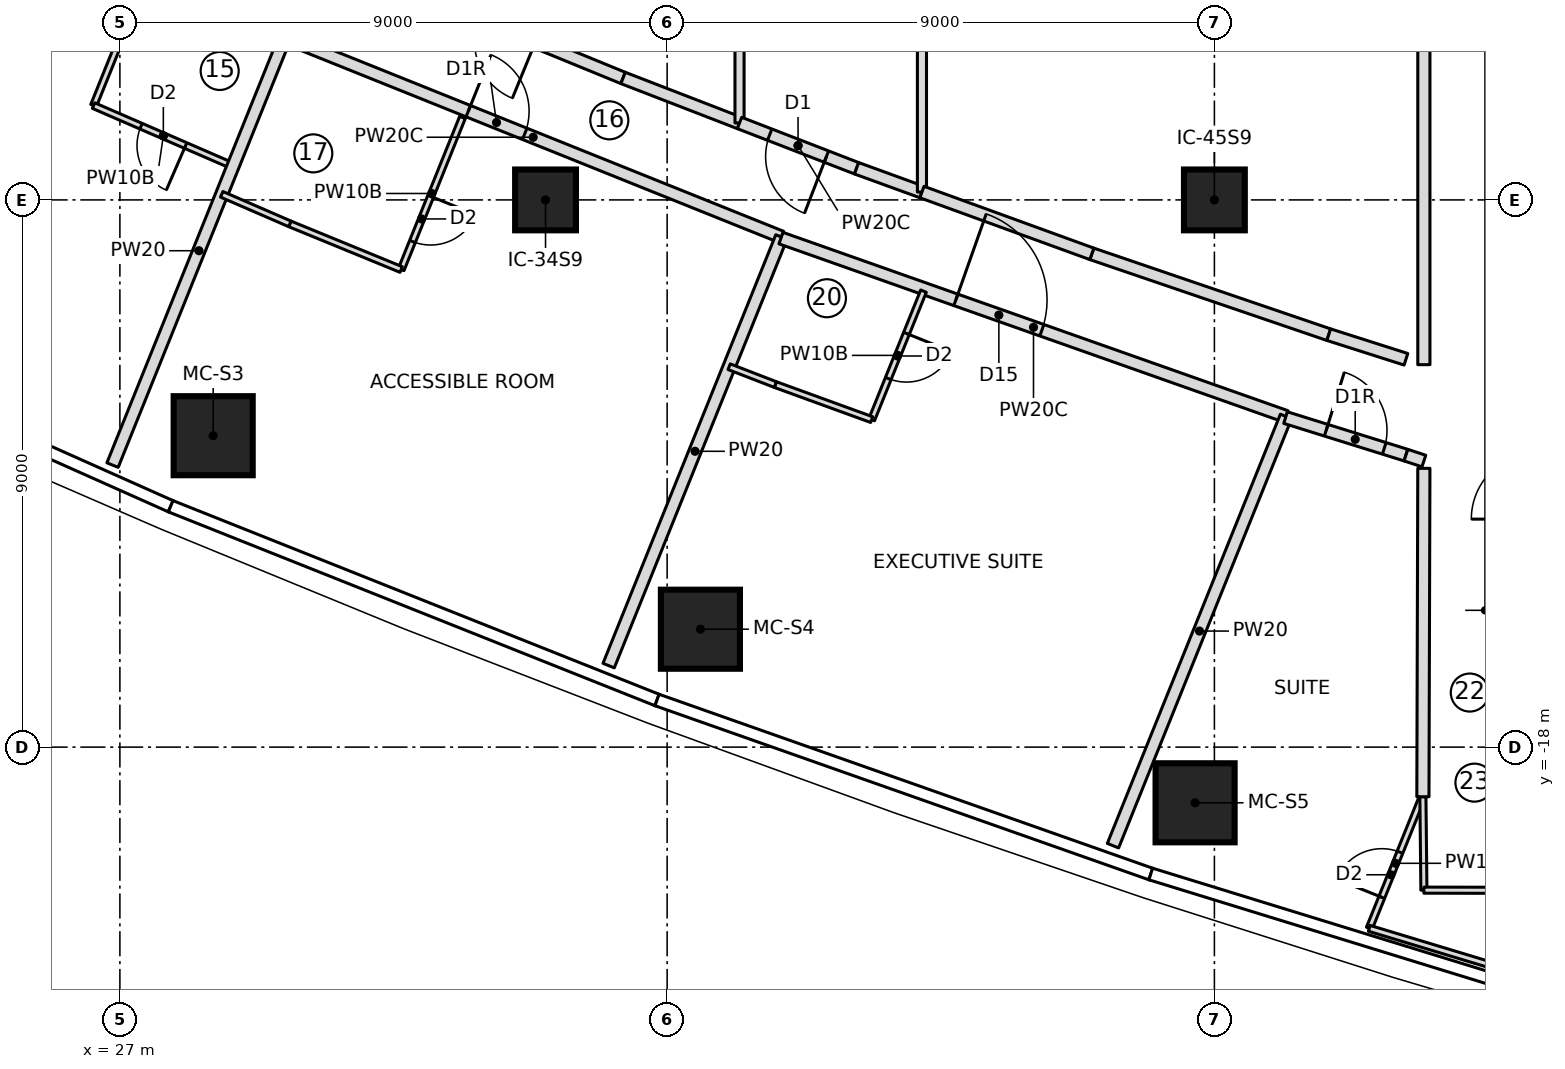
"""IFC4 building model, lengths in metres.
Left out: names, types, materials, properties, quantities, classifications, styles, units other than length and angle.
Written with IfcOpenShell. Run it as: python <this file> out.ifc"""

import sys

from ifc_helpers import new_model, si_unit, direction, frame, frame_2d, origin, origin_2d, place, context, subcontext, project, spatial, rectangle, extrude, element, fill, save


model = new_model("IFC4")
c1 = context("Model", 3, precision=1e-05, world=origin(), true_north=direction((0.0, 1.0)))
c2 = subcontext(c1, "Body", "Model", "MODEL_VIEW")
j1 = project(units=[si_unit("LENGTHUNIT", "METRE"), si_unit("PLANEANGLEUNIT", "RADIAN")], contexts=[c1])
p1 = place(None, origin())
s1 = spatial("IfcSite", under=j1, at=p1, CompositionType="ELEMENT")
p2 = place(p1, origin())
s2 = spatial("IfcBuilding", under=s1, at=p2, CompositionType="ELEMENT")
p3 = place(p2, frame((0.0, 0.0, 193.25)))
s3 = spatial("IfcBuildingStorey", under=s2, at=p3, CompositionType="ELEMENT", Elevation=193.25)
for number, where, z_axis, x_axis in (
    (1, (28.534, -12.878, 0.0), (0.0, 0.0, 1.0), (1.0, 0.0, 0.0)),
    (2, (36.547, -16.061, 0.0), (0.0, 0.0, 1.0), (1.0, 0.0, 0.0)),
    (3, (44.683, -18.916, 0.0), (0.0, 0.0, 1.0), (1.0, 0.0, 0.0)),
):
    element("IfcColumn", number, at=place(p3, frame(where, z_axis=z_axis, x_axis=x_axis)), inside=s3, PredefinedType="COLUMN", context=c2, shape_type="SweptSolid", body=[
        extrude(rectangle(XDim=1.3, YDim=1.3, at=origin_2d()), origin(), (0.0, 0.0, 1.0), 3.55),
    ])
for number, where, z_axis, x_axis in (
    (4, (34.0, -9.0, 0.0), (0.0, 0.0, 1.0), (1.0, 0.0, 0.0)),
    (5, (45.0, -9.0, 0.0), (0.0, 0.0, 1.0), (1.0, 0.0, 0.0)),
):
    element("IfcColumn", number, at=place(p3, frame(where, z_axis=z_axis, x_axis=x_axis)), inside=s3, PredefinedType="COLUMN", context=c2, shape_type="SweptSolid", body=[
        extrude(rectangle(XDim=1.0, YDim=1.0, at=origin_2d()), origin(), (0.0, 0.0, 1.0), 3.55),
    ])
p4 = place(p3, frame((26.567, -7.449, 0.0), z_axis=(0.0, 0.0, 1.0), x_axis=(0.373957926662, 0.927445669075, 0.0)))
e6 = element("IfcWall", 6, at=p4, inside=s3, PredefinedType="PARTITIONING", context=c2, shape_type="SweptSolid", body=[
    extrude(rectangle(XDim=2.278, YDim=0.1, at=frame_2d((1.139, 0.0))), origin(), (0.0, 0.0, 1.0), 3.25),
])
p5 = place(p3, frame((28.861, -8.444, 0.0), z_axis=(0.0, 0.0, 1.0), x_axis=(-0.917363173809, 0.398051262199, 0.0)))
e7 = element("IfcWall", 7, at=p5, inside=s3, PredefinedType="PARTITIONING", context=c2, shape_type="SweptSolid", body=[
    extrude(rectangle(XDim=2.5, YDim=0.1, at=frame_2d((1.25, 0.0))), origin(), (0.0, 0.0, 1.0), 3.25),
])
p6 = place(p5, frame((0.85, 0.0, 0.0)))
e8 = element("IfcOpeningElement", 8, at=p6, cuts=e7, PredefinedType="OPENING", context=c2, shape_type="SweptSolid", body=[
    extrude(rectangle(XDim=0.8, YDim=2.1, at=frame_2d((0.4, 1.05))), frame((0.0, 0.06, 0.0), z_axis=(0.0, -1.0, 0.0), x_axis=(1.0, 0.0, 0.0)), (0.0, 0.0, 1.0), 0.12),
])
p7 = place(p3, frame((26.879, -13.361, 0.0), z_axis=(0.0, 0.0, 1.0), x_axis=(0.37388636046, 0.927474522271, 0.0)))
e9 = element("IfcWall", 9, at=p7, inside=s3, PredefinedType="PARTITIONING", context=c2, shape_type="SweptSolid", body=[
    extrude(rectangle(XDim=7.603, YDim=0.2, at=frame_2d((3.801, 0.0))), origin(), (0.0, 0.0, 1.0), 3.25),
])
p8 = place(p3, frame((29.714, -6.329, 0.0), z_axis=(0.0, 0.0, 1.0), x_axis=(0.927886226391, -0.372863448026, 0.0)))
e10 = element("IfcWall", 10, at=p8, inside=s3, PredefinedType="PARTITIONING", context=c2, shape_type="SweptSolid", body=[
    extrude(rectangle(XDim=8.8, YDim=0.2, at=frame_2d((4.4, 0.0))), origin(), (0.0, 0.0, 1.0), 3.25),
])
p9 = place(p8, frame((3.25, 0.0, 0.0)))
e11 = element("IfcOpeningElement", 11, at=p9, cuts=e10, PredefinedType="OPENING", context=c2, shape_type="SweptSolid", body=[
    extrude(rectangle(XDim=1.0, YDim=2.1, at=frame_2d((0.5, 1.05))), frame((0.0, 0.11, 0.0), z_axis=(0.0, -1.0, 0.0), x_axis=(1.0, 0.0, 0.0)), (0.0, 0.0, 1.0), 0.22),
])
p10 = place(p3, frame((32.635, -7.644, 0.0), z_axis=(0.0, 0.0, 1.0), x_axis=(-0.373933172856, -0.927455649742, 0.0)))
e12 = element("IfcWall", 12, at=p10, inside=s3, PredefinedType="PARTITIONING", context=c2, shape_type="SweptSolid", body=[
    extrude(rectangle(XDim=2.697, YDim=0.1, at=frame_2d((1.349, 0.0))), origin(), (0.0, 0.0, 1.0), 3.25),
])
p11 = place(p10, frame((1.4, 0.0, 0.0)))
e13 = element("IfcOpeningElement", 13, at=p11, cuts=e12, PredefinedType="OPENING", context=c2, shape_type="SweptSolid", body=[
    extrude(rectangle(XDim=0.8, YDim=2.1, at=frame_2d((0.4, 1.05))), frame((0.0, 0.06, 0.0), z_axis=(0.0, -1.0, 0.0), x_axis=(1.0, 0.0, 0.0)), (0.0, 0.0, 1.0), 0.12),
])
p12 = place(p3, frame((31.626, -10.145, 0.0), z_axis=(0.0, 0.0, 1.0), x_axis=(-0.925208599746, 0.379458887043, 0.0)))
e14 = element("IfcWall", 14, at=p12, inside=s3, PredefinedType="PARTITIONING", context=c2, shape_type="SweptSolid", body=[
    extrude(rectangle(XDim=1.979, YDim=0.1, at=frame_2d((0.99, 0.0))), origin(), (0.0, 0.0, 1.0), 3.25),
])
p13 = place(p3, frame((29.795, -9.394, 0.0), z_axis=(0.0, 0.0, 1.0), x_axis=(-0.917378066425, 0.398016938386, 0.0)))
e15 = element("IfcWall", 15, at=p13, inside=s3, PredefinedType="PARTITIONING", context=c2, shape_type="SweptSolid", body=[
    extrude(rectangle(XDim=1.221, YDim=0.1, at=frame_2d((0.611, 0.0))), origin(), (0.0, 0.0, 1.0), 3.25),
])
p14 = place(p3, frame((35.038, -16.659, 0.0), z_axis=(0.0, 0.0, 1.0), x_axis=(0.373892577014, 0.927472016211, 0.0)))
e16 = element("IfcWall", 16, at=p14, inside=s3, PredefinedType="PARTITIONING", context=c2, shape_type="SweptSolid", body=[
    extrude(rectangle(XDim=7.601, YDim=0.2, at=frame_2d((3.8, 0.0))), origin(), (0.0, 0.0, 1.0), 3.25),
])
p15 = place(p3, frame((37.872, -9.628, 0.0), z_axis=(0.0, 0.0, 1.0), x_axis=(0.9429299378, -0.332991189675, 0.0)))
e17 = element("IfcWall", 17, at=p15, inside=s3, PredefinedType="PARTITIONING", context=c2, shape_type="SweptSolid", body=[
    extrude(rectangle(XDim=8.808, YDim=0.2, at=frame_2d((4.404, 0.0))), origin(), (0.0, 0.0, 1.0), 3.25),
])
p16 = place(p15, frame((3.05, 0.0, 0.0)))
e18 = element("IfcOpeningElement", 18, at=p16, cuts=e17, PredefinedType="OPENING", context=c2, shape_type="SweptSolid", body=[
    extrude(rectangle(XDim=1.5, YDim=2.1, at=frame_2d((0.75, 1.05))), frame((0.0, 0.11, 0.0), z_axis=(0.0, -1.0, 0.0), x_axis=(1.0, 0.0, 0.0)), (0.0, 0.0, 1.0), 0.22),
])
p17 = place(p3, frame((40.216, -10.5, 0.0), z_axis=(0.0, 0.0, 1.0), x_axis=(-0.373883593317, -0.927475637765, 0.0)))
e19 = element("IfcWall", 19, at=p17, inside=s3, PredefinedType="PARTITIONING", context=c2, shape_type="SweptSolid", body=[
    extrude(rectangle(XDim=2.278, YDim=0.1, at=frame_2d((1.139, 0.0))), origin(), (0.0, 0.0, 1.0), 3.25),
])
p18 = place(p17, frame((0.75, 0.0, 0.0)))
e20 = element("IfcOpeningElement", 20, at=p18, cuts=e19, PredefinedType="OPENING", context=c2, shape_type="SweptSolid", body=[
    extrude(rectangle(XDim=0.8, YDim=2.1, at=frame_2d((0.4, 1.05))), frame((0.0, 0.06, 0.0), z_axis=(0.0, -1.0, 0.0), x_axis=(1.0, 0.0, 0.0)), (0.0, 0.0, 1.0), 0.12),
])
p19 = place(p3, frame((39.364, -12.614, 0.0), z_axis=(0.0, 0.0, 1.0), x_axis=(-0.939759586286, 0.341836101053, 0.0)))
e21 = element("IfcWall", 21, at=p19, inside=s3, PredefinedType="PARTITIONING", context=c2, shape_type="SweptSolid", body=[
    extrude(rectangle(XDim=1.686, YDim=0.1, at=frame_2d((0.843, 0.0))), origin(), (0.0, 0.0, 1.0), 3.25),
])
p20 = place(p3, frame((37.78, -12.037, 0.0), z_axis=(0.0, 0.0, 1.0), x_axis=(-0.9326493613, 0.360784102846, 0.0)))
e22 = element("IfcWall", 22, at=p20, inside=s3, PredefinedType="PARTITIONING", context=c2, shape_type="SweptSolid", body=[
    extrude(rectangle(XDim=0.815, YDim=0.1, at=frame_2d((0.408, 0.0))), origin(), (0.0, 0.0, 1.0), 3.25),
])
p21 = place(p3, frame((43.332, -19.621, 0.0), z_axis=(0.0, 0.0, 1.0), x_axis=(0.373905590149, 0.927466770108, 0.0)))
e23 = element("IfcWall", 23, at=p21, inside=s3, PredefinedType="PARTITIONING", context=c2, shape_type="SweptSolid", body=[
    extrude(rectangle(XDim=7.611, YDim=0.2, at=frame_2d((3.806, 0.0))), origin(), (0.0, 0.0, 1.0), 3.25),
])
p22 = place(p3, frame((47.547, -20.98, 0.0), z_axis=(0.0, 0.0, 1.0), x_axis=(0.373908119057, 0.927465750582, 0.0)))
e24 = element("IfcWall", 24, at=p22, inside=s3, PredefinedType="PARTITIONING", context=c2, shape_type="SweptSolid", body=[
    extrude(rectangle(XDim=2.306, YDim=0.1, at=frame_2d((1.153, 0.0))), origin(), (0.0, 0.0, 1.0), 3.25),
])
p23 = place(p22, frame((0.55, 0.0, 0.0)))
e25 = element("IfcOpeningElement", 25, at=p23, cuts=e24, PredefinedType="OPENING", context=c2, shape_type="SweptSolid", body=[
    extrude(rectangle(XDim=0.8, YDim=2.1, at=frame_2d((0.4, 1.05))), frame((0.0, 0.06, 0.0), z_axis=(0.0, -1.0, 0.0), x_axis=(1.0, 0.0, 0.0)), (0.0, 0.0, 1.0), 0.12),
])
p24 = place(p3, frame((35.276, -6.994, 0.0), z_axis=(0.0, 0.0, 1.0), x_axis=(-0.92520652337, 0.379463949689, 0.0)))
e26 = element("IfcWall", 26, at=p24, inside=s3, PredefinedType="PARTITIONING", context=c2, shape_type="SweptSolid", body=[
    extrude(rectangle(XDim=4.117, YDim=0.2, at=frame_2d((2.059, 0.0))), origin(), (0.0, 0.0, 1.0), 3.25),
])
p25 = place(p24, frame((1.559, 0.0, 0.0)))
e27 = element("IfcOpeningElement", 27, at=p25, cuts=e26, PredefinedType="OPENING", context=c2, shape_type="SweptSolid", body=[
    extrude(rectangle(XDim=1.0, YDim=2.1, at=frame_2d((0.5, 1.05))), frame((0.0, 0.11, 0.0), z_axis=(0.0, -1.0, 0.0), x_axis=(1.0, 0.0, 0.0)), (0.0, 0.0, 1.0), 0.22),
])
p26 = place(p3, frame((37.19, -7.735, 0.0), z_axis=(0.0, 0.0, 1.0), x_axis=(-0.932688150298, 0.360683814848, 0.0)))
e28 = element("IfcWall", 28, at=p26, inside=s3, PredefinedType="PARTITIONING", context=c2, shape_type="SweptSolid", body=[
    extrude(rectangle(XDim=2.053, YDim=0.2, at=frame_2d((1.026, 0.0))), origin(), (0.0, 0.0, 1.0), 3.25),
])
p27 = place(p3, frame((37.19, -7.735, 0.0), z_axis=(0.0, 0.0, 1.0), x_axis=(0.0, 1.0, 0.0)))
e29 = element("IfcWall", 29, at=p27, inside=s3, PredefinedType="PARTITIONING", context=c2, shape_type="SweptSolid", body=[
    extrude(rectangle(XDim=15.47, YDim=0.15, at=frame_2d((7.735, 0.0))), origin(), (0.0, 0.0, 1.0), 3.25),
])
p28 = place(p3, frame((39.115, -8.479, 0.0), z_axis=(0.0, 0.0, 1.0), x_axis=(-0.9326579855, 0.360761807961, 0.0)))
e30 = element("IfcWall", 30, at=p28, inside=s3, PredefinedType="PARTITIONING", context=c2, shape_type="SweptSolid", body=[
    extrude(rectangle(XDim=2.064, YDim=0.2, at=frame_2d((1.032, 0.0))), origin(), (0.0, 0.0, 1.0), 3.25),
])
p29 = place(p28, frame((0.532, 0.0, 0.0)))
e31 = element("IfcOpeningElement", 31, at=p29, cuts=e30, PredefinedType="OPENING", context=c2, shape_type="SweptSolid", body=[
    extrude(rectangle(XDim=1.0, YDim=2.1, at=frame_2d((0.5, 1.05))), frame((0.0, 0.11, 0.0), z_axis=(0.0, -1.0, 0.0), x_axis=(1.0, 0.0, 0.0)), (0.0, 0.0, 1.0), 0.22),
])
p30 = place(p3, frame((40.19, -8.871, 0.0), z_axis=(0.0, 0.0, 1.0), x_axis=(-0.939731092615, 0.34191442434, 0.0)))
e32 = element("IfcWall", 32, at=p30, inside=s3, PredefinedType="PARTITIONING", context=c2, shape_type="SweptSolid", body=[
    extrude(rectangle(XDim=1.144, YDim=0.2, at=frame_2d((0.572, 0.0))), origin(), (0.0, 0.0, 1.0), 3.25),
])
p31 = place(p3, frame((40.19, -8.871, 0.0), z_axis=(0.0, 0.0, 1.0), x_axis=(0.0, 1.0, 0.0)))
e33 = element("IfcWall", 33, at=p31, inside=s3, PredefinedType="PARTITIONING", context=c2, shape_type="SweptSolid", body=[
    extrude(rectangle(XDim=17.741, YDim=0.15, at=frame_2d((8.871, 0.0))), origin(), (0.0, 0.0, 1.0), 3.25),
])
p32 = place(p3, frame((46.881, -11.217, 0.0), z_axis=(0.0, 0.0, 1.0), x_axis=(-0.946436071896, 0.322891253852, 0.0)))
e34 = element("IfcWall", 34, at=p32, inside=s3, PredefinedType="PARTITIONING", context=c2, shape_type="SweptSolid", body=[
    extrude(rectangle(XDim=4.117, YDim=0.2, at=frame_2d((2.059, 0.0))), origin(), (0.0, 0.0, 1.0), 3.25),
])
p33 = place(p3, frame((42.984, -9.887, 0.0), z_axis=(0.0, 0.0, 1.0), x_axis=(-0.939726274687, 0.341927665833, 0.0)))
e35 = element("IfcWall", 35, at=p33, inside=s3, PredefinedType="PARTITIONING", context=c2, shape_type="SweptSolid", body=[
    extrude(rectangle(XDim=2.973, YDim=0.2, at=frame_2d((1.487, 0.0))), origin(), (0.0, 0.0, 1.0), 3.25),
])
p34 = place(p3, frame((48.429, -18.816, 0.0), z_axis=(0.0, 0.0, 1.0), x_axis=(0.010805026288, -0.999941624, 0.0)))
e36 = element("IfcWall", 36, at=p34, inside=s3, PredefinedType="PARTITIONING", context=c2, shape_type="SweptSolid", body=[
    extrude(rectangle(XDim=1.536, YDim=0.1, at=frame_2d((0.768, 0.0))), origin(), (0.0, 0.0, 1.0), 3.25),
])
p35 = place(p3, frame((48.446, -20.352, 0.0), z_axis=(0.0, 0.0, 1.0), x_axis=(0.999998406651, -0.001785131852, 0.0)))
e37 = element("IfcWall", 37, at=p35, inside=s3, PredefinedType="PARTITIONING", context=c2, shape_type="SweptSolid", body=[
    extrude(rectangle(XDim=1.504, YDim=0.1, at=frame_2d((0.752, 0.0))), origin(), (0.0, 0.0, 1.0), 3.25),
])
p36 = place(p3, frame((49.95, -21.706, 0.0), z_axis=(0.0, 0.0, 1.0), x_axis=(-0.957251518155, 0.289256859885, 0.0)))
e38 = element("IfcWall", 38, at=p36, inside=s3, PredefinedType="PARTITIONING", context=c2, shape_type="SweptSolid", body=[
    extrude(rectangle(XDim=2.51, YDim=0.1, at=frame_2d((1.255, 0.0))), origin(), (0.0, 0.0, 1.0), 3.25),
])
p37 = place(p3, frame((46.17, -12.58, 0.0), z_axis=(0.0, 0.0, 1.0), x_axis=(0.954639063921, -0.297765440634, 0.0)))
e39 = element("IfcWall", 39, at=p37, inside=s3, PredefinedType="PARTITIONING", context=c2, shape_type="SweptSolid", body=[
    extrude(rectangle(XDim=2.073, YDim=0.2, at=frame_2d((1.037, 0.0))), origin(), (0.0, 0.0, 1.0), 3.25),
])
p38 = place(p37, frame((0.7, 0.0, 0.0)))
e40 = element("IfcOpeningElement", 40, at=p38, cuts=e39, PredefinedType="OPENING", context=c2, shape_type="SweptSolid", body=[
    extrude(rectangle(XDim=1.0, YDim=2.1, at=frame_2d((0.5, 1.05))), frame((0.0, 0.11, 0.0), z_axis=(0.0, -1.0, 0.0), x_axis=(1.0, 0.0, 0.0)), (0.0, 0.0, 1.0), 0.22),
])
p39 = place(p3, frame((48.15, -11.621, 0.0), z_axis=(0.0, 0.0, 1.0), x_axis=(-0.952761948983, 0.303718074157, 0.0)))
e41 = element("IfcWall", 41, at=p39, inside=s3, PredefinedType="PARTITIONING", context=c2, shape_type="SweptSolid", body=[
    extrude(rectangle(XDim=1.332, YDim=0.2, at=frame_2d((0.666, 0.0))), origin(), (0.0, 0.0, 1.0), 3.25),
])
p40 = place(p3, frame((48.445, 11.71, 0.0), z_axis=(0.0, 0.0, 1.0), x_axis=(0.0, -1.0, 0.0)))
e42 = element("IfcWall", 42, at=p40, inside=s3, PredefinedType="PARTITIONING", context=c2, shape_type="SweptSolid", body=[
    extrude(rectangle(XDim=23.42, YDim=0.2, at=frame_2d((11.71, 0.0))), origin(), (0.0, 0.0, 1.0), 3.25),
])
p41 = place(p3, frame((48.15, -13.198, 0.0), z_axis=(0.0, 0.0, 1.0), x_axis=(0.949621636458, -0.313398703843, 0.0)))
e43 = element("IfcWall", 43, at=p41, inside=s3, PredefinedType="PARTITIONING", context=c2, shape_type="SweptSolid", body=[
    extrude(rectangle(XDim=0.311, YDim=0.2, at=frame_2d((0.155, 0.0))), origin(), (0.0, 0.0, 1.0), 3.25),
])
p42 = place(p3, frame((48.445, -13.415, 0.0), z_axis=(0.0, 0.0, 1.0), x_axis=(-0.002938106018, -0.999995683757, 0.0)))
e44 = element("IfcWall", 44, at=p42, inside=s3, PredefinedType="PARTITIONING", context=c2, shape_type="SweptSolid", body=[
    extrude(rectangle(XDim=5.401, YDim=0.2, at=frame_2d((2.701, 0.0))), origin(), (0.0, 0.0, 1.0), 3.25),
])
p43 = place(p6, origin())
e45 = element("IfcDoor", 45, at=p43, inside=s3, OperationType="SINGLE_SWING_LEFT", PredefinedType="DOOR", context=c2, shape_type="SweptSolid", body=[
    extrude(rectangle(XDim=0.8, YDim=2.1, at=frame_2d((0.4, 1.05))), frame((0.0, 0.025, 0.0), z_axis=(0.0, -1.0, 0.0), x_axis=(1.0, 0.0, 0.0)), (0.0, 0.0, 1.0), 0.05),
])
fill(e8, e45)
p44 = place(p11, origin())
e46 = element("IfcDoor", 46, at=p44, inside=s3, OperationType="SINGLE_SWING_LEFT", PredefinedType="DOOR", context=c2, shape_type="SweptSolid", body=[
    extrude(rectangle(XDim=0.8, YDim=2.1, at=frame_2d((0.4, 1.05))), frame((0.0, 0.025, 0.0), z_axis=(0.0, -1.0, 0.0), x_axis=(1.0, 0.0, 0.0)), (0.0, 0.0, 1.0), 0.05),
])
fill(e13, e46)
p45 = place(p9, origin())
e47 = element("IfcDoor", 47, at=p45, inside=s3, OperationType="SINGLE_SWING_RIGHT", PredefinedType="DOOR", context=c2, shape_type="SweptSolid", body=[
    extrude(rectangle(XDim=1.0, YDim=2.1, at=frame_2d((0.5, 1.05))), frame((0.0, 0.025, 0.0), z_axis=(0.0, -1.0, 0.0), x_axis=(1.0, 0.0, 0.0)), (0.0, 0.0, 1.0), 0.05),
])
fill(e11, e47)
p46 = place(p18, origin())
e48 = element("IfcDoor", 48, at=p46, inside=s3, OperationType="SINGLE_SWING_LEFT", PredefinedType="DOOR", context=c2, shape_type="SweptSolid", body=[
    extrude(rectangle(XDim=0.8, YDim=2.1, at=frame_2d((0.4, 1.05))), frame((0.0, 0.025, 0.0), z_axis=(0.0, -1.0, 0.0), x_axis=(1.0, 0.0, 0.0)), (0.0, 0.0, 1.0), 0.05),
])
fill(e20, e48)
p47 = place(p16, origin())
e49 = element("IfcDoor", 49, at=p47, inside=s3, OperationType="DOUBLE_DOOR_SINGLE_SWING", PredefinedType="DOOR", context=c2, shape_type="SweptSolid", body=[
    extrude(rectangle(XDim=1.5, YDim=2.1, at=frame_2d((0.75, 1.05))), frame((0.0, 0.025, 0.0), z_axis=(0.0, -1.0, 0.0), x_axis=(1.0, 0.0, 0.0)), (0.0, 0.0, 1.0), 0.05),
])
fill(e18, e49)
p48 = place(p23, origin())
e50 = element("IfcDoor", 50, at=p48, inside=s3, OperationType="SINGLE_SWING_LEFT", PredefinedType="DOOR", context=c2, shape_type="SweptSolid", body=[
    extrude(rectangle(XDim=0.8, YDim=2.1, at=frame_2d((0.4, 1.05))), frame((0.0, 0.025, 0.0), z_axis=(0.0, -1.0, 0.0), x_axis=(1.0, 0.0, 0.0)), (0.0, 0.0, 1.0), 0.05),
])
fill(e25, e50)
p49 = place(p38, origin())
e51 = element("IfcDoor", 51, at=p49, inside=s3, OperationType="SINGLE_SWING_RIGHT", PredefinedType="DOOR", context=c2, shape_type="SweptSolid", body=[
    extrude(rectangle(XDim=1.0, YDim=2.1, at=frame_2d((0.5, 1.05))), frame((0.0, 0.025, 0.0), z_axis=(0.0, -1.0, 0.0), x_axis=(1.0, 0.0, 0.0)), (0.0, 0.0, 1.0), 0.05),
])
fill(e40, e51)
p50 = place(p29, origin())
e52 = element("IfcDoor", 52, at=p50, inside=s3, OperationType="SINGLE_SWING_LEFT", PredefinedType="DOOR", context=c2, shape_type="SweptSolid", body=[
    extrude(rectangle(XDim=1.0, YDim=2.1, at=frame_2d((0.5, 1.05))), frame((0.0, 0.025, 0.0), z_axis=(0.0, -1.0, 0.0), x_axis=(1.0, 0.0, 0.0)), (0.0, 0.0, 1.0), 0.05),
])
fill(e31, e52)
save(model, sys.argv[1])
